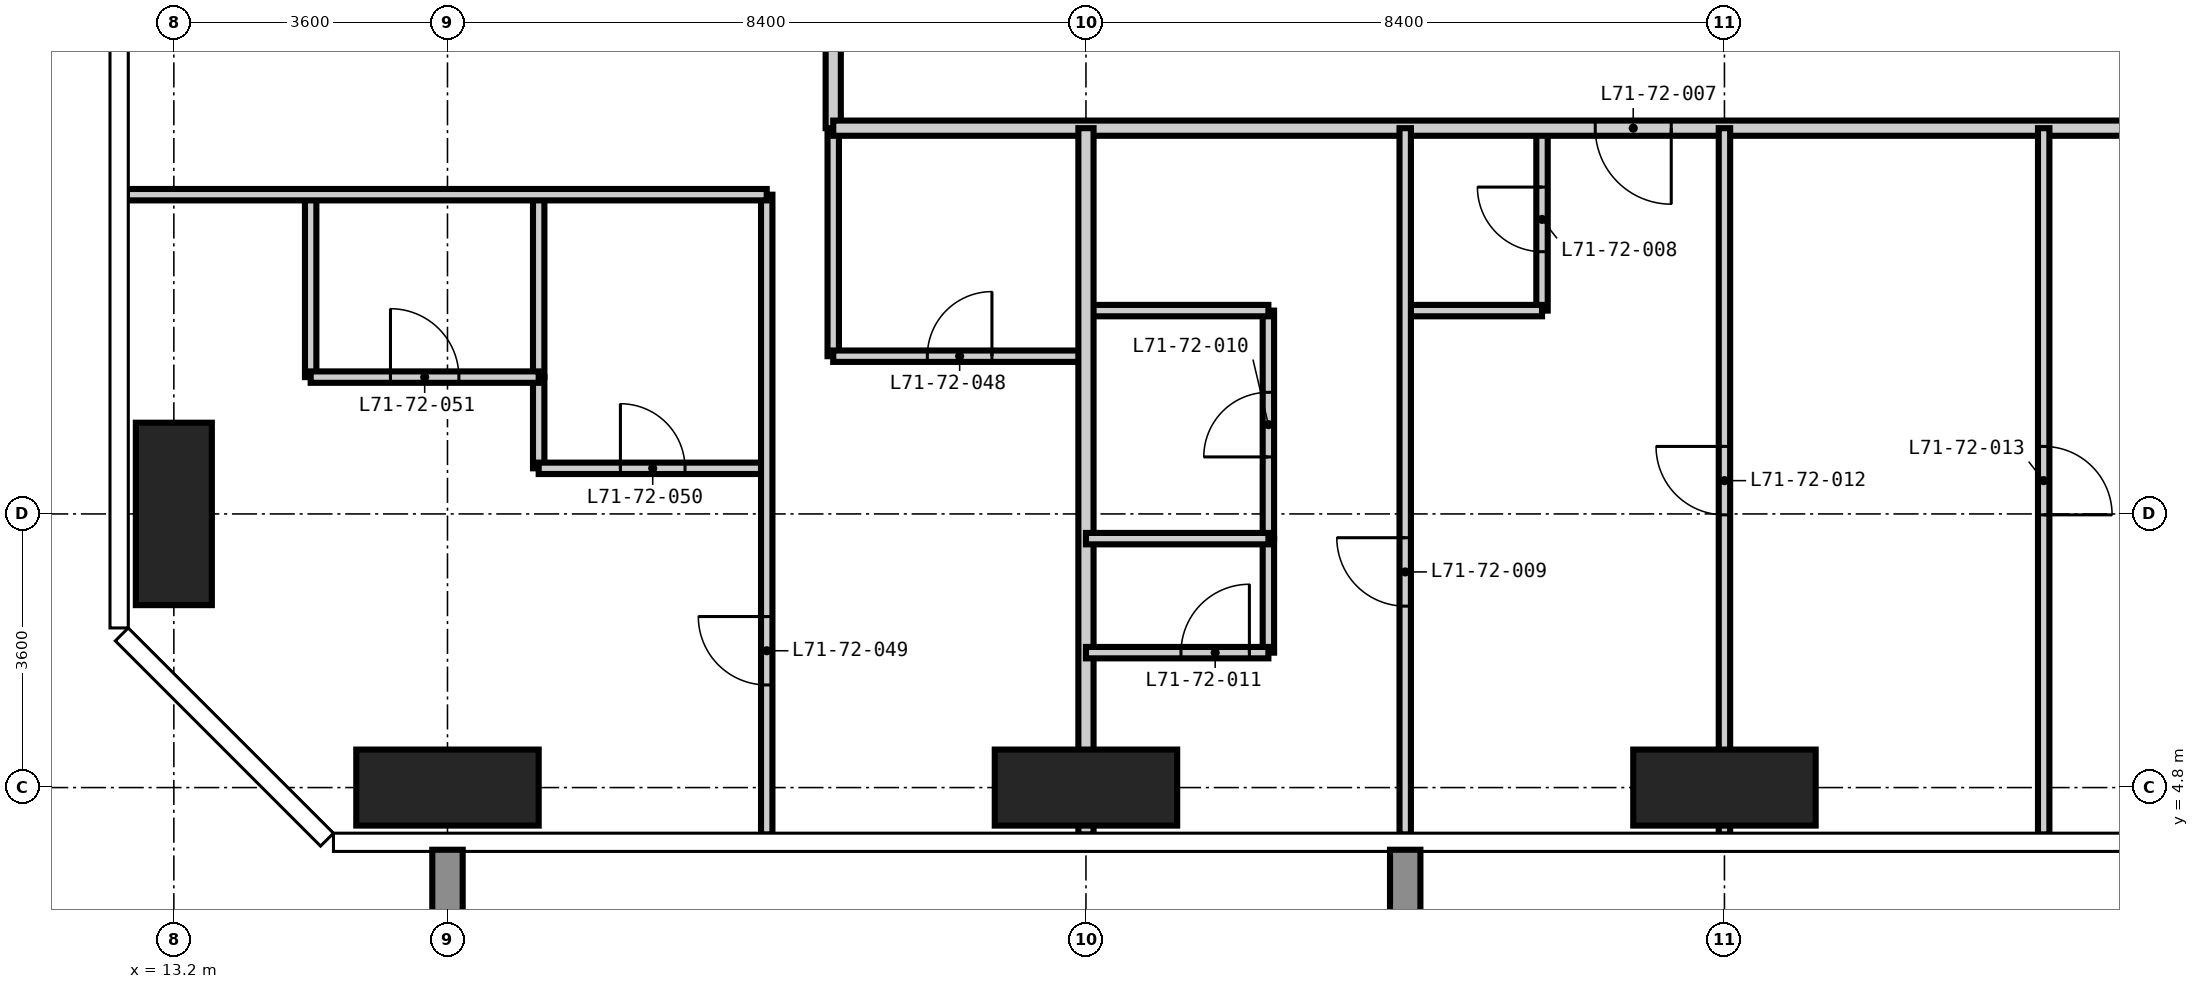
"""IFC4 building model, lengths in metres.
Left out: names, types, materials, properties, quantities, classifications, styles, units other than length and angle.
Written with IfcOpenShell. Run it as: python <this file> out.ifc"""

import sys

from ifc_helpers import new_model, si_unit, direction, frame, frame_2d, origin, origin_2d, place, context, subcontext, project, spatial, rectangle, extrude, element, fill, save


model = new_model("IFC4")
c1 = context("Model", 3, precision=1e-05, world=origin(), true_north=direction((0.0, 1.0)))
c2 = subcontext(c1, "Body", "Model", "MODEL_VIEW")
j1 = project(units=[si_unit("LENGTHUNIT", "METRE"), si_unit("PLANEANGLEUNIT", "RADIAN")], contexts=[c1])
p1 = place(None, origin())
s1 = spatial("IfcSite", under=j1, at=p1, CompositionType="ELEMENT")
p2 = place(p1, origin())
s2 = spatial("IfcBuilding", under=s1, at=p2, CompositionType="ELEMENT")
p3 = place(p2, frame((0.0, 0.0, 276.3)))
s3 = spatial("IfcBuildingStorey", under=s2, at=p3, CompositionType="ELEMENT", Elevation=276.3)
p4 = place(p3, frame((13.2, 8.4, -0.35), z_axis=(0.0, 0.0, 1.0), x_axis=(1.0, 0.0, 0.0)))
e1 = element("IfcColumn", 1, at=p4, inside=s3, PredefinedType="COLUMN", context=c2, shape_type="SweptSolid", body=[
    extrude(rectangle(XDim=1.0, YDim=2.4, at=origin_2d()), origin(), (0.0, 0.0, 1.0), 3.9),
])
for number, where, z_axis, x_axis in (
    (2, (16.8, 4.8, -0.35), (0.0, 0.0, 1.0), (1.0, 0.0, 0.0)),
    (3, (25.2, 4.8, -0.35), (0.0, 0.0, 1.0), (1.0, 0.0, 0.0)),
    (4, (33.6, 4.8, -0.35), (0.0, 0.0, 1.0), (1.0, 0.0, 0.0)),
):
    element("IfcColumn", number, at=place(p3, frame(where, z_axis=z_axis, x_axis=x_axis)), inside=s3, PredefinedType="COLUMN", context=c2, shape_type="SweptSolid", body=[
        extrude(rectangle(XDim=2.4, YDim=1.0, at=origin_2d()), origin(), (0.0, 0.0, 1.0), 3.9),
    ])
p5 = place(p3, frame((18.0, 9.0, 0.0), z_axis=(0.0, 0.0, 1.0), x_axis=(0.0, 1.0, 0.0)))
e5 = element("IfcWall", 5, at=p5, inside=s3, PredefinedType="PARTITIONING", context=c2, shape_type="SweptSolid", body=[
    extrude(rectangle(XDim=1.2, YDim=0.15, at=frame_2d((0.6, 0.0))), origin(), (0.0, 0.0, 1.0), 3.55),
])
p6 = place(p3, frame((21.875, 10.475, 0.0), z_axis=(0.0, 0.0, 1.0), x_axis=(0.0, 1.0, 0.0)))
e6 = element("IfcWall", 6, at=p6, inside=s3, PredefinedType="PARTITIONING", context=c2, shape_type="SweptSolid", body=[
    extrude(rectangle(XDim=3.0, YDim=0.15, at=frame_2d((1.5, 0.0))), origin(), (0.0, 0.0, 1.0), 3.55),
])
p7 = place(p3, frame((27.6, 8.075, 0.0), z_axis=(0.0, 0.0, 1.0), x_axis=(0.0, 1.0, 0.0)))
e7 = element("IfcWall", 7, at=p7, inside=s3, PredefinedType="PARTITIONING", context=c2, shape_type="SweptSolid", body=[
    extrude(rectangle(XDim=3.0, YDim=0.15, at=frame_2d((1.5, 0.0))), origin(), (0.0, 0.0, 1.0), 3.55),
])
p8 = place(p7, frame((1.075, 0.0, 0.0)))
e8 = element("IfcOpeningElement", 8, at=p8, cuts=e7, PredefinedType="OPENING", context=c2, shape_type="SweptSolid", body=[
    extrude(rectangle(XDim=0.85, YDim=2.1, at=frame_2d((0.425, 1.05))), frame((0.0, 0.085, 0.0), z_axis=(0.0, -1.0, 0.0), x_axis=(1.0, 0.0, 0.0)), (0.0, 0.0, 1.0), 0.17),
])
p9 = place(p3, frame((31.2, 11.075, 0.0), z_axis=(0.0, 0.0, 1.0), x_axis=(0.0, 1.0, 0.0)))
e9 = element("IfcWall", 9, at=p9, inside=s3, PredefinedType="PARTITIONING", context=c2, shape_type="SweptSolid", body=[
    extrude(rectangle(XDim=2.4, YDim=0.15, at=frame_2d((1.2, 0.0))), origin(), (0.0, 0.0, 1.0), 3.55),
])
p10 = place(p9, frame((0.775, 0.0, 0.0)))
e10 = element("IfcOpeningElement", 10, at=p10, cuts=e9, PredefinedType="OPENING", context=c2, shape_type="SweptSolid", body=[
    extrude(rectangle(XDim=0.85, YDim=2.1, at=frame_2d((0.425, 1.05))), frame((0.0, 0.085, 0.0), z_axis=(0.0, -1.0, 0.0), x_axis=(1.0, 0.0, 0.0)), (0.0, 0.0, 1.0), 0.17),
])
p11 = place(p3, frame((18.0, 9.0, 0.0), z_axis=(0.0, 0.0, 1.0), x_axis=(1.0, 0.0, 0.0)))
e11 = element("IfcWall", 11, at=p11, inside=s3, PredefinedType="PARTITIONING", context=c2, shape_type="SweptSolid", body=[
    extrude(rectangle(XDim=3.0, YDim=0.15, at=frame_2d((1.5, 0.0))), origin(), (0.0, 0.0, 1.0), 3.55),
])
p12 = place(p11, frame((1.075, 0.0, 0.0)))
e12 = element("IfcOpeningElement", 12, at=p12, cuts=e11, PredefinedType="OPENING", context=c2, shape_type="SweptSolid", body=[
    extrude(rectangle(XDim=0.85, YDim=2.1, at=frame_2d((0.425, 1.05))), frame((0.0, 0.085, 0.0), z_axis=(0.0, -1.0, 0.0), x_axis=(1.0, 0.0, 0.0)), (0.0, 0.0, 1.0), 0.17),
])
p13 = place(p3, frame((21.875, 10.475, 0.0), z_axis=(0.0, 0.0, 1.0), x_axis=(1.0, 0.0, 0.0)))
e13 = element("IfcWall", 13, at=p13, inside=s3, PredefinedType="PARTITIONING", context=c2, shape_type="SweptSolid", body=[
    extrude(rectangle(XDim=3.325, YDim=0.15, at=frame_2d((1.663, 0.0))), origin(), (0.0, 0.0, 1.0), 3.55),
])
p14 = place(p13, frame((1.238, 0.0, 0.0)))
e14 = element("IfcOpeningElement", 14, at=p14, cuts=e13, PredefinedType="OPENING", context=c2, shape_type="SweptSolid", body=[
    extrude(rectangle(XDim=0.85, YDim=2.1, at=frame_2d((0.425, 1.05))), frame((0.0, 0.085, 0.0), z_axis=(0.0, -1.0, 0.0), x_axis=(1.0, 0.0, 0.0)), (0.0, 0.0, 1.0), 0.17),
])
p15 = place(p3, frame((25.2, 11.075, 0.0), z_axis=(0.0, 0.0, 1.0), x_axis=(1.0, 0.0, 0.0)))
e15 = element("IfcWall", 15, at=p15, inside=s3, PredefinedType="PARTITIONING", context=c2, shape_type="SweptSolid", body=[
    extrude(rectangle(XDim=2.4, YDim=0.15, at=frame_2d((1.2, 0.0))), origin(), (0.0, 0.0, 1.0), 3.55),
])
p16 = place(p3, frame((29.4, 11.075, 0.0), z_axis=(0.0, 0.0, 1.0), x_axis=(1.0, 0.0, 0.0)))
e16 = element("IfcWall", 16, at=p16, inside=s3, PredefinedType="PARTITIONING", context=c2, shape_type="SweptSolid", body=[
    extrude(rectangle(XDim=1.8, YDim=0.15, at=frame_2d((0.9, 0.0))), origin(), (0.0, 0.0, 1.0), 3.55),
])
p17 = place(p3, frame((21.875, 13.475, 0.0), z_axis=(0.0, 0.0, 1.0), x_axis=(0.0, 1.0, 0.0)))
e17 = element("IfcWall", 17, at=p17, inside=s3, PredefinedType="PARTITIONING", context=c2, shape_type="SweptSolid", body=[
    extrude(rectangle(XDim=31.25, YDim=0.2, at=frame_2d((15.625, 0.0))), origin(), (0.0, 0.0, 1.0), 3.55),
])
p18 = place(p17, frame((4.925, 0.0, 0.0)))
e18 = element("IfcOpeningElement", 18, at=p18, cuts=e17, PredefinedType="OPENING", context=c2, shape_type="SweptSolid", body=[
    extrude(rectangle(XDim=1.0, YDim=2.2, at=frame_2d((0.5, 1.1))), frame((0.0, 0.11, 0.0), z_axis=(0.0, -1.0, 0.0), x_axis=(1.0, 0.0, 0.0)), (0.0, 0.0, 1.0), 0.22),
])
p19 = place(p17, frame((11.225, 0.0, 0.0)))
e19 = element("IfcOpeningElement", 19, at=p19, cuts=e17, PredefinedType="OPENING", context=c2, shape_type="SweptSolid", body=[
    extrude(rectangle(XDim=1.0, YDim=2.2, at=frame_2d((0.5, 1.1))), frame((0.0, 0.11, 0.0), z_axis=(0.0, -1.0, 0.0), x_axis=(1.0, 0.0, 0.0)), (0.0, 0.0, 1.0), 0.22),
])
p20 = place(p17, frame((19.625, 0.0, 0.0)))
e20 = element("IfcOpeningElement", 20, at=p20, cuts=e17, PredefinedType="OPENING", context=c2, shape_type="SweptSolid", body=[
    extrude(rectangle(XDim=1.0, YDim=2.2, at=frame_2d((0.5, 1.1))), frame((0.0, 0.11, 0.0), z_axis=(0.0, -1.0, 0.0), x_axis=(1.0, 0.0, 0.0)), (0.0, 0.0, 1.0), 0.22),
])
p21 = place(p17, frame((25.925, 0.0, 0.0)))
e21 = element("IfcOpeningElement", 21, at=p21, cuts=e17, PredefinedType="OPENING", context=c2, shape_type="SweptSolid", body=[
    extrude(rectangle(XDim=1.0, YDim=2.2, at=frame_2d((0.5, 1.1))), frame((0.0, 0.11, 0.0), z_axis=(0.0, -1.0, 0.0), x_axis=(1.0, 0.0, 0.0)), (0.0, 0.0, 1.0), 0.22),
])
p22 = place(p17, frame((1.162, 0.0, 0.0)))
e22 = element("IfcOpeningElement", 22, at=p22, cuts=e17, PredefinedType="OPENING", context=c2, shape_type="SweptSolid", body=[
    extrude(rectangle(XDim=1.0, YDim=2.2, at=frame_2d((0.5, 1.1))), frame((0.0, 0.11, 0.0), z_axis=(0.0, -1.0, 0.0), x_axis=(1.0, 0.0, 0.0)), (0.0, 0.0, 1.0), 0.22),
])
p23 = place(p17, frame((29.387, 0.0, 0.0)))
e23 = element("IfcOpeningElement", 23, at=p23, cuts=e17, PredefinedType="OPENING", context=c2, shape_type="SweptSolid", body=[
    extrude(rectangle(XDim=1.0, YDim=2.2, at=frame_2d((0.5, 1.1))), frame((0.0, 0.11, 0.0), z_axis=(0.0, -1.0, 0.0), x_axis=(1.0, 0.0, 0.0)), (0.0, 0.0, 1.0), 0.22),
])
p24 = place(p3, frame((44.125, 13.475, 0.0), z_axis=(0.0, 0.0, 1.0), x_axis=(-1.0, 0.0, 0.0)))
e24 = element("IfcWall", 24, at=p24, inside=s3, PredefinedType="PARTITIONING", context=c2, shape_type="SweptSolid", body=[
    extrude(rectangle(XDim=22.25, YDim=0.2, at=frame_2d((11.125, 0.0))), origin(), (0.0, 0.0, 1.0), 3.55),
])
p25 = place(p24, frame((11.225, 0.0, 0.0)))
e25 = element("IfcOpeningElement", 25, at=p25, cuts=e24, PredefinedType="OPENING", context=c2, shape_type="SweptSolid", body=[
    extrude(rectangle(XDim=1.0, YDim=2.2, at=frame_2d((0.5, 1.1))), frame((0.0, 0.11, 0.0), z_axis=(0.0, -1.0, 0.0), x_axis=(1.0, 0.0, 0.0)), (0.0, 0.0, 1.0), 0.22),
])
p26 = place(p3, frame((25.2, 4.182, 0.0), z_axis=(0.0, 0.0, 1.0), x_axis=(0.0, 1.0, 0.0)))
e26 = element("IfcWall", 26, at=p26, inside=s3, PredefinedType="PARTITIONING", context=c2, shape_type="SweptSolid", body=[
    extrude(rectangle(XDim=9.293, YDim=0.2, at=frame_2d((4.646, 0.0))), origin(), (0.0, 0.0, 1.0), 3.55),
])
for number, where, z_axis, x_axis in (
    (27, (15.0, 10.2, 0.0), (0.0, 0.0, 1.0), (0.0, 1.0, 0.0)),
    (28, (18.0, 10.2, 0.0), (0.0, 0.0, 1.0), (0.0, 1.0, 0.0)),
):
    element("IfcWall", number, at=place(p3, frame(where, z_axis=z_axis, x_axis=x_axis)), inside=s3, PredefinedType="PARTITIONING", context=c2, shape_type="SweptSolid", body=[
        extrude(rectangle(XDim=2.4, YDim=0.15, at=frame_2d((1.2, 0.0))), origin(), (0.0, 0.0, 1.0), 3.55),
    ])
p27 = place(p3, frame((21.0, 4.182, 0.0), z_axis=(0.0, 0.0, 1.0), x_axis=(0.0, 1.0, 0.0)))
e29 = element("IfcWall", 29, at=p27, inside=s3, PredefinedType="PARTITIONING", context=c2, shape_type="SweptSolid", body=[
    extrude(rectangle(XDim=8.418, YDim=0.15, at=frame_2d((4.209, 0.0))), origin(), (0.0, 0.0, 1.0), 3.55),
])
p28 = place(p27, frame((1.968, 0.0, 0.0)))
e30 = element("IfcOpeningElement", 30, at=p28, cuts=e29, PredefinedType="OPENING", context=c2, shape_type="SweptSolid", body=[
    extrude(rectangle(XDim=0.9, YDim=2.1, at=frame_2d((0.45, 1.05))), frame((0.0, 0.085, 0.0), z_axis=(0.0, -1.0, 0.0), x_axis=(1.0, 0.0, 0.0)), (0.0, 0.0, 1.0), 0.17),
])
p29 = place(p3, frame((27.6, 6.575, 0.0), z_axis=(0.0, 0.0, 1.0), x_axis=(0.0, 1.0, 0.0)))
e31 = element("IfcWall", 31, at=p29, inside=s3, PredefinedType="PARTITIONING", context=c2, shape_type="SweptSolid", body=[
    extrude(rectangle(XDim=1.5, YDim=0.15, at=frame_2d((0.75, 0.0))), origin(), (0.0, 0.0, 1.0), 3.55),
])
p30 = place(p3, frame((29.4, 4.182, 0.0), z_axis=(0.0, 0.0, 1.0), x_axis=(0.0, 1.0, 0.0)))
e32 = element("IfcWall", 32, at=p30, inside=s3, PredefinedType="PARTITIONING", context=c2, shape_type="SweptSolid", body=[
    extrude(rectangle(XDim=9.293, YDim=0.15, at=frame_2d((4.646, 0.0))), origin(), (0.0, 0.0, 1.0), 3.55),
])
p31 = place(p30, frame((3.005, 0.0, 0.0)))
e33 = element("IfcOpeningElement", 33, at=p31, cuts=e32, PredefinedType="OPENING", context=c2, shape_type="SweptSolid", body=[
    extrude(rectangle(XDim=0.9, YDim=2.1, at=frame_2d((0.45, 1.05))), frame((0.0, 0.085, 0.0), z_axis=(0.0, -1.0, 0.0), x_axis=(1.0, 0.0, 0.0)), (0.0, 0.0, 1.0), 0.17),
])
p32 = place(p3, frame((33.6, 4.182, 0.0), z_axis=(0.0, 0.0, 1.0), x_axis=(0.0, 1.0, 0.0)))
e34 = element("IfcWall", 34, at=p32, inside=s3, PredefinedType="PARTITIONING", context=c2, shape_type="SweptSolid", body=[
    extrude(rectangle(XDim=9.293, YDim=0.15, at=frame_2d((4.646, 0.0))), origin(), (0.0, 0.0, 1.0), 3.55),
])
p33 = place(p32, frame((4.206, 0.0, 0.0)))
e35 = element("IfcOpeningElement", 35, at=p33, cuts=e34, PredefinedType="OPENING", context=c2, shape_type="SweptSolid", body=[
    extrude(rectangle(XDim=0.9, YDim=2.1, at=frame_2d((0.45, 1.05))), frame((0.0, 0.085, 0.0), z_axis=(0.0, -1.0, 0.0), x_axis=(1.0, 0.0, 0.0)), (0.0, 0.0, 1.0), 0.17),
])
p34 = place(p3, frame((37.8, 4.182, 0.0), z_axis=(0.0, 0.0, 1.0), x_axis=(0.0, 1.0, 0.0)))
e36 = element("IfcWall", 36, at=p34, inside=s3, PredefinedType="PARTITIONING", context=c2, shape_type="SweptSolid", body=[
    extrude(rectangle(XDim=9.293, YDim=0.15, at=frame_2d((4.646, 0.0))), origin(), (0.0, 0.0, 1.0), 3.55),
])
p35 = place(p34, frame((4.206, 0.0, 0.0)))
e37 = element("IfcOpeningElement", 37, at=p35, cuts=e36, PredefinedType="OPENING", context=c2, shape_type="SweptSolid", body=[
    extrude(rectangle(XDim=0.9, YDim=2.1, at=frame_2d((0.45, 1.05))), frame((0.0, 0.085, 0.0), z_axis=(0.0, -1.0, 0.0), x_axis=(1.0, 0.0, 0.0)), (0.0, 0.0, 1.0), 0.17),
])
p36 = place(p3, frame((25.2, 6.575, 0.0), z_axis=(0.0, 0.0, 1.0), x_axis=(1.0, 0.0, 0.0)))
e38 = element("IfcWall", 38, at=p36, inside=s3, PredefinedType="PARTITIONING", context=c2, shape_type="SweptSolid", body=[
    extrude(rectangle(XDim=2.4, YDim=0.15, at=frame_2d((1.2, 0.0))), origin(), (0.0, 0.0, 1.0), 3.55),
])
p37 = place(p36, frame((1.25, 0.0, 0.0)))
e39 = element("IfcOpeningElement", 39, at=p37, cuts=e38, PredefinedType="OPENING", context=c2, shape_type="SweptSolid", body=[
    extrude(rectangle(XDim=0.9, YDim=2.1, at=frame_2d((0.45, 1.05))), frame((0.0, 0.085, 0.0), z_axis=(0.0, -1.0, 0.0), x_axis=(1.0, 0.0, 0.0)), (0.0, 0.0, 1.0), 0.17),
])
p38 = place(p3, frame((25.2, 8.075, 0.0), z_axis=(0.0, 0.0, 1.0), x_axis=(1.0, 0.0, 0.0)))
e40 = element("IfcWall", 40, at=p38, inside=s3, PredefinedType="PARTITIONING", context=c2, shape_type="SweptSolid", body=[
    extrude(rectangle(XDim=2.4, YDim=0.15, at=frame_2d((1.2, 0.0))), origin(), (0.0, 0.0, 1.0), 3.55),
])
p39 = place(p3, frame((15.0, 10.2, 0.0), z_axis=(0.0, 0.0, 1.0), x_axis=(1.0, 0.0, 0.0)))
e41 = element("IfcWall", 41, at=p39, inside=s3, PredefinedType="PARTITIONING", context=c2, shape_type="SweptSolid", body=[
    extrude(rectangle(XDim=3.0, YDim=0.15, at=frame_2d((1.5, 0.0))), origin(), (0.0, 0.0, 1.0), 3.55),
])
p40 = place(p39, frame((1.05, 0.0, 0.0)))
e42 = element("IfcOpeningElement", 42, at=p40, cuts=e41, PredefinedType="OPENING", context=c2, shape_type="SweptSolid", body=[
    extrude(rectangle(XDim=0.9, YDim=2.1, at=frame_2d((0.45, 1.05))), frame((0.0, 0.085, 0.0), z_axis=(0.0, -1.0, 0.0), x_axis=(1.0, 0.0, 0.0)), (0.0, 0.0, 1.0), 0.17),
])
p41 = place(p3, frame((12.582, 12.6, 0.0), z_axis=(0.0, 0.0, 1.0), x_axis=(1.0, 0.0, 0.0)))
e43 = element("IfcWall", 43, at=p41, inside=s3, PredefinedType="PARTITIONING", context=c2, shape_type="SweptSolid", body=[
    extrude(rectangle(XDim=8.418, YDim=0.15, at=frame_2d((4.209, 0.0))), origin(), (0.0, 0.0, 1.0), 3.55),
])
p42 = place(p25, origin())
e44 = element("IfcDoor", 44, at=p42, inside=s3, OperationType="SINGLE_SWING_LEFT", PredefinedType="DOOR", context=c2, shape_type="SweptSolid", body=[
    extrude(rectangle(XDim=1.0, YDim=2.2, at=frame_2d((0.5, 1.1))), frame((0.0, 0.025, 0.0), z_axis=(0.0, -1.0, 0.0), x_axis=(1.0, 0.0, 0.0)), (0.0, 0.0, 1.0), 0.05),
])
fill(e25, e44)
p43 = place(p10, origin())
e45 = element("IfcDoor", 45, at=p43, inside=s3, OperationType="SINGLE_SWING_RIGHT", PredefinedType="DOOR", context=c2, shape_type="SweptSolid", body=[
    extrude(rectangle(XDim=0.85, YDim=2.1, at=frame_2d((0.425, 1.05))), frame((0.0, 0.025, 0.0), z_axis=(0.0, -1.0, 0.0), x_axis=(1.0, 0.0, 0.0)), (0.0, 0.0, 1.0), 0.05),
])
fill(e10, e45)
p44 = place(p31, origin())
e46 = element("IfcDoor", 46, at=p44, inside=s3, OperationType="SINGLE_SWING_RIGHT", PredefinedType="DOOR", context=c2, shape_type="SweptSolid", body=[
    extrude(rectangle(XDim=0.9, YDim=2.1, at=frame_2d((0.45, 1.05))), frame((0.0, 0.025, 0.0), z_axis=(0.0, -1.0, 0.0), x_axis=(1.0, 0.0, 0.0)), (0.0, 0.0, 1.0), 0.05),
])
fill(e33, e46)
p45 = place(p8, origin())
e47 = element("IfcDoor", 47, at=p45, inside=s3, OperationType="SINGLE_SWING_LEFT", PredefinedType="DOOR", context=c2, shape_type="SweptSolid", body=[
    extrude(rectangle(XDim=0.85, YDim=2.1, at=frame_2d((0.425, 1.05))), frame((0.0, 0.025, 0.0), z_axis=(0.0, -1.0, 0.0), x_axis=(1.0, 0.0, 0.0)), (0.0, 0.0, 1.0), 0.05),
])
fill(e8, e47)
p46 = place(p37, origin())
e48 = element("IfcDoor", 48, at=p46, inside=s3, OperationType="SINGLE_SWING_RIGHT", PredefinedType="DOOR", context=c2, shape_type="SweptSolid", body=[
    extrude(rectangle(XDim=0.9, YDim=2.1, at=frame_2d((0.45, 1.05))), frame((0.0, 0.025, 0.0), z_axis=(0.0, -1.0, 0.0), x_axis=(1.0, 0.0, 0.0)), (0.0, 0.0, 1.0), 0.05),
])
fill(e39, e48)
p47 = place(p33, origin())
e49 = element("IfcDoor", 49, at=p47, inside=s3, OperationType="SINGLE_SWING_RIGHT", PredefinedType="DOOR", context=c2, shape_type="SweptSolid", body=[
    extrude(rectangle(XDim=0.9, YDim=2.1, at=frame_2d((0.45, 1.05))), frame((0.0, 0.025, 0.0), z_axis=(0.0, -1.0, 0.0), x_axis=(1.0, 0.0, 0.0)), (0.0, 0.0, 1.0), 0.05),
])
fill(e35, e49)
p48 = place(p35, frame((0.9, 0.0, 0.0), z_axis=(0.0, 0.0, 1.0), x_axis=(-1.0, 0.0, 0.0)))
e50 = element("IfcDoor", 50, at=p48, inside=s3, OperationType="SINGLE_SWING_RIGHT", PredefinedType="DOOR", context=c2, shape_type="SweptSolid", body=[
    extrude(rectangle(XDim=0.9, YDim=2.1, at=frame_2d((0.45, 1.05))), frame((0.0, 0.025, 0.0), z_axis=(0.0, -1.0, 0.0), x_axis=(1.0, 0.0, 0.0)), (0.0, 0.0, 1.0), 0.05),
])
fill(e37, e50)
p49 = place(p14, origin())
e51 = element("IfcDoor", 51, at=p49, inside=s3, OperationType="SINGLE_SWING_RIGHT", PredefinedType="DOOR", context=c2, shape_type="SweptSolid", body=[
    extrude(rectangle(XDim=0.85, YDim=2.1, at=frame_2d((0.425, 1.05))), frame((0.0, 0.025, 0.0), z_axis=(0.0, -1.0, 0.0), x_axis=(1.0, 0.0, 0.0)), (0.0, 0.0, 1.0), 0.05),
])
fill(e14, e51)
p50 = place(p28, origin())
e52 = element("IfcDoor", 52, at=p50, inside=s3, OperationType="SINGLE_SWING_RIGHT", PredefinedType="DOOR", context=c2, shape_type="SweptSolid", body=[
    extrude(rectangle(XDim=0.9, YDim=2.1, at=frame_2d((0.45, 1.05))), frame((0.0, 0.025, 0.0), z_axis=(0.0, -1.0, 0.0), x_axis=(1.0, 0.0, 0.0)), (0.0, 0.0, 1.0), 0.05),
])
fill(e30, e52)
p51 = place(p12, origin())
e53 = element("IfcDoor", 53, at=p51, inside=s3, OperationType="SINGLE_SWING_LEFT", PredefinedType="DOOR", context=c2, shape_type="SweptSolid", body=[
    extrude(rectangle(XDim=0.85, YDim=2.1, at=frame_2d((0.425, 1.05))), frame((0.0, 0.025, 0.0), z_axis=(0.0, -1.0, 0.0), x_axis=(1.0, 0.0, 0.0)), (0.0, 0.0, 1.0), 0.05),
])
fill(e12, e53)
p52 = place(p40, origin())
e54 = element("IfcDoor", 54, at=p52, inside=s3, OperationType="SINGLE_SWING_LEFT", PredefinedType="DOOR", context=c2, shape_type="SweptSolid", body=[
    extrude(rectangle(XDim=0.9, YDim=2.1, at=frame_2d((0.45, 1.05))), frame((0.0, 0.025, 0.0), z_axis=(0.0, -1.0, 0.0), x_axis=(1.0, 0.0, 0.0)), (0.0, 0.0, 1.0), 0.05),
])
fill(e42, e54)
save(model, sys.argv[1])
